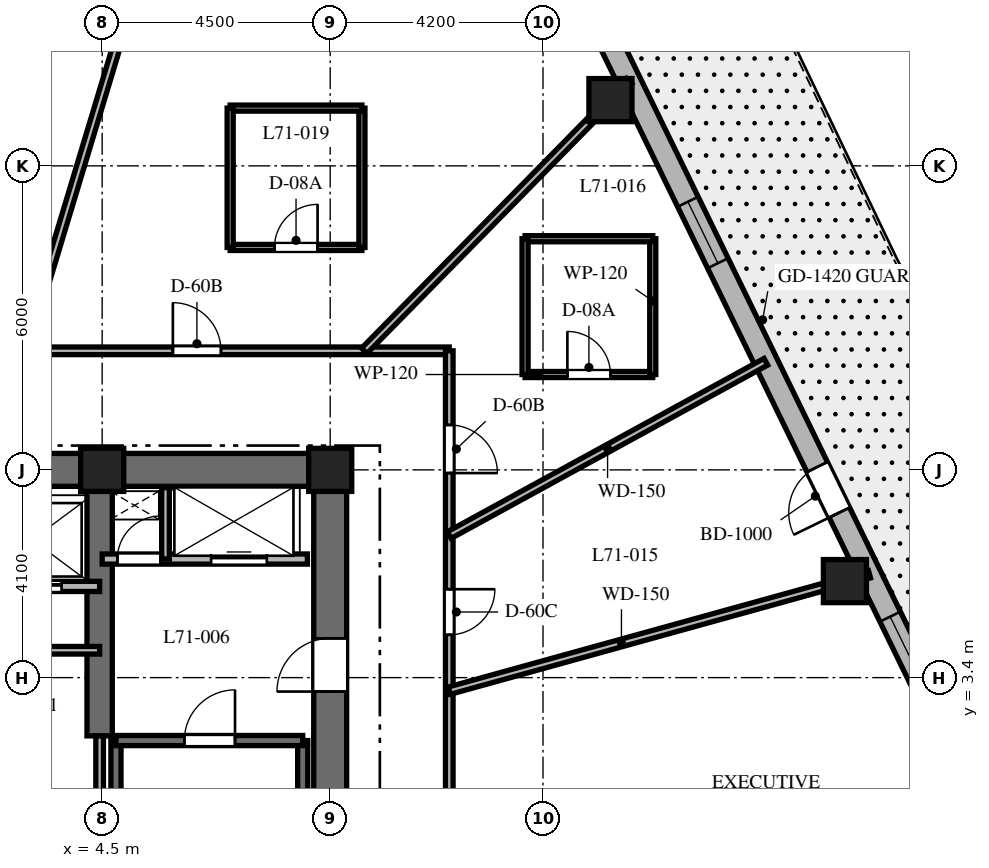
"""IFC4 building model, lengths in metres.
Left out: names, types, materials, properties, quantities, classifications, styles, units other than length and angle.
Written with IfcOpenShell. Run it as: python <this file> out.ifc"""

import sys

from ifc_helpers import new_model, si_unit, direction, frame, frame_2d, origin, origin_2d, place, context, subcontext, project, spatial, rectangle, extrude, element, fill, save


model = new_model("IFC4")
c1 = context("Model", 3, precision=1e-05, world=origin(), true_north=direction((0.0, 1.0)))
c2 = subcontext(c1, "Body", "Model", "MODEL_VIEW")
j1 = project(units=[si_unit("LENGTHUNIT", "METRE"), si_unit("PLANEANGLEUNIT", "RADIAN")], contexts=[c1])
p1 = place(None, origin())
s1 = spatial("IfcSite", under=j1, at=p1, CompositionType="ELEMENT")
p2 = place(p1, origin())
s2 = spatial("IfcBuilding", under=s1, at=p2, CompositionType="ELEMENT")
p3 = place(p2, frame((0.0, 0.0, 284.7)))
s3 = spatial("IfcBuildingStorey", under=s2, at=p3, CompositionType="ELEMENT", Elevation=284.7)
p4 = place(p3, frame((1.85, 7.5, 0.0), z_axis=(0.0, 0.0, 1.0), x_axis=(1.0, 0.0, 0.0)))
e1 = element("IfcWall", 1, at=p4, inside=s3, PredefinedType="SHEAR", context=c2, shape_type="SweptSolid", body=[
    extrude(rectangle(XDim=7.475, YDim=0.65, at=frame_2d((3.737, 0.0))), origin(), (0.0, 0.0, 1.0), 3.9),
])
p5 = place(p3, frame((9.0, -7.175, 0.0), z_axis=(0.0, 0.0, 1.0), x_axis=(0.0, 1.0, 0.0)))
e2 = element("IfcWall", 2, at=p5, inside=s3, PredefinedType="SHEAR", context=c2, shape_type="SweptSolid", body=[
    extrude(rectangle(XDim=14.35, YDim=0.65, at=frame_2d((7.175, 0.0))), origin(), (0.0, 0.0, 1.0), 3.9),
])
p6 = place(p5, frame((10.3, 0.0, 0.0)))
e3 = element("IfcOpeningElement", 3, at=p6, cuts=e2, PredefinedType="OPENING", context=c2, shape_type="SweptSolid", body=[
    extrude(rectangle(XDim=1.05, YDim=2.15, at=frame_2d((0.525, 1.075))), frame((0.0, 0.335, 0.0), z_axis=(0.0, -1.0, 0.0), x_axis=(1.0, 0.0, 0.0)), (0.0, 0.0, 1.0), 0.67),
])
p7 = place(p3, frame((4.45, 2.25, 0.0), z_axis=(0.0, 0.0, 1.0), x_axis=(0.0, 1.0, 0.0)))
e4 = element("IfcWall", 4, at=p7, inside=s3, PredefinedType="SHEAR", context=c2, shape_type="SweptSolid", body=[
    extrude(rectangle(XDim=4.925, YDim=0.5, at=frame_2d((2.462, 0.0))), origin(), (0.0, 0.0, 1.0), 3.9),
])
for number, where, z_axis, x_axis in (
    (5, (4.772, -6.985, 0.0), (0.0, 0.0, 1.0), (0.0, 1.0, 0.0)),
    (6, (8.458, -6.985, 0.0), (0.0, 0.0, 1.0), (0.0, 1.0, 0.0)),
):
    element("IfcWall", number, at=place(p3, frame(where, z_axis=z_axis, x_axis=x_axis)), inside=s3, PredefinedType="SHEAR", context=c2, shape_type="SweptSolid", body=[
        extrude(rectangle(XDim=9.143, YDim=0.2, at=frame_2d((4.572, 0.0))), origin(), (0.0, 0.0, 1.0), 3.9),
    ])
p8 = place(p3, frame((4.772, 2.158, 0.0), z_axis=(0.0, 0.0, 1.0), x_axis=(1.0, 0.0, 0.0)))
e7 = element("IfcWall", 7, at=p8, inside=s3, PredefinedType="SHEAR", context=c2, shape_type="SweptSolid", body=[
    extrude(rectangle(XDim=3.686, YDim=0.2, at=frame_2d((1.843, 0.0))), origin(), (0.0, 0.0, 1.0), 3.9),
])
p9 = place(p8, frame((1.35, 0.0, 0.0)))
e8 = element("IfcOpeningElement", 8, at=p9, cuts=e7, PredefinedType="OPENING", context=c2, shape_type="SweptSolid", body=[
    extrude(rectangle(XDim=1.0, YDim=2.15, at=frame_2d((0.5, 1.075))), frame((0.0, 0.11, 0.0), z_axis=(0.0, -1.0, 0.0), x_axis=(1.0, 0.0, 0.0)), (0.0, 0.0, 1.0), 0.22),
])
for number, where, z_axis, x_axis in (
    (9, (9.0, 7.5, 0.0), (0.0, 0.0, 1.0), (1.0, 0.0, 0.0)),
    (10, (4.5, 7.5, 0.0), (0.0, 0.0, 1.0), (1.0, 0.0, 0.0)),
    (11, (19.158, 5.305, 0.0), (0.0, 0.0, 1.0), (1.0, 0.0, 0.0)),
    (12, (14.531, 14.798, 0.0), (0.0, 0.0, 1.0), (1.0, 0.0, 0.0)),
):
    element("IfcColumn", number, at=place(p3, frame(where, z_axis=z_axis, x_axis=x_axis)), inside=s3, PredefinedType="COLUMN", context=c2, shape_type="SweptSolid", body=[
        extrude(rectangle(XDim=0.85, YDim=0.85, at=origin_2d()), origin(), (0.0, 0.0, 1.0), 3.9),
    ])
p10 = place(p3, frame((21.138, 2.371, 0.0), z_axis=(0.0, 0.0, 1.0), x_axis=(-0.438128124058, 0.89891253574, 0.0)))
e13 = element("IfcWall", 13, at=p10, inside=s3, PredefinedType="SOLIDWALL", context=c2, shape_type="SweptSolid", body=[
    extrude(rectangle(XDim=17.565, YDim=0.45, at=frame_2d((8.782, 0.0))), origin(), (0.0, 0.0, 1.0), 3.58),
])
p11 = place(p10, frame((4.769, 0.0, 0.0)))
e14 = element("IfcOpeningElement", 14, at=p11, cuts=e13, PredefinedType="OPENING", context=c2, shape_type="SweptSolid", body=[
    extrude(rectangle(XDim=1.0, YDim=2.15, at=frame_2d((0.5, 1.075))), frame((0.0, 0.235, 0.0), z_axis=(0.0, -1.0, 0.0), x_axis=(1.0, 0.0, 0.0)), (0.0, 0.0, 1.0), 0.47),
])
p12 = place(p10, frame((10.243, 0.0, 0.8)))
e15 = element("IfcOpeningElement", 15, at=p12, cuts=e13, PredefinedType="OPENING", context=c2, shape_type="SweptSolid", body=[
    extrude(rectangle(XDim=1.35, YDim=1.75, at=frame_2d((0.675, 0.875))), frame((0.0, 0.235, 0.0), z_axis=(0.0, -1.0, 0.0), x_axis=(1.0, 0.0, 0.0)), (0.0, 0.0, 1.0), 0.47),
])
p13 = place(p10, frame((15.132, 0.0, 0.8)))
e16 = element("IfcOpeningElement", 16, at=p13, cuts=e13, PredefinedType="OPENING", context=c2, shape_type="SweptSolid", body=[
    extrude(rectangle(XDim=1.35, YDim=1.75, at=frame_2d((0.675, 0.875))), frame((0.0, 0.235, 0.0), z_axis=(0.0, -1.0, 0.0), x_axis=(1.0, 0.0, 0.0)), (0.0, 0.0, 1.0), 0.47),
])
p14 = place(p10, frame((1.133, 0.0, 0.8)))
e17 = element("IfcOpeningElement", 17, at=p14, cuts=e13, PredefinedType="OPENING", context=c2, shape_type="SweptSolid", body=[
    extrude(rectangle(XDim=1.35, YDim=1.75, at=frame_2d((0.675, 0.875))), frame((0.0, 0.235, 0.0), z_axis=(0.0, -1.0, 0.0), x_axis=(1.0, 0.0, 0.0)), (0.0, 0.0, 1.0), 0.47),
])
p15 = place(p3, frame((4.5, 5.74, 0.0), z_axis=(0.0, 0.0, 1.0), x_axis=(1.0, 0.0, 0.0)))
e18 = element("IfcWall", 18, at=p15, inside=s3, PredefinedType="PARTITIONING", context=c2, shape_type="SweptSolid", body=[
    extrude(rectangle(XDim=4.05, YDim=0.2, at=frame_2d((2.025, 0.0))), origin(), (0.0, 0.0, 1.0), 3.58),
])
p16 = place(p15, frame((0.3, 0.0, 0.0)))
e19 = element("IfcOpeningElement", 19, at=p16, cuts=e18, PredefinedType="OPENING", context=c2, shape_type="SweptSolid", body=[
    extrude(rectangle(XDim=0.85, YDim=2.03, at=frame_2d((0.425, 1.015))), frame((0.0, 0.11, 0.0), z_axis=(0.0, -1.0, 0.0), x_axis=(1.0, 0.0, 0.0)), (0.0, 0.0, 1.0), 0.22),
])
p17 = place(p15, frame((2.15, 0.0, 0.0)))
e20 = element("IfcOpeningElement", 20, at=p17, cuts=e18, PredefinedType="OPENING", context=c2, shape_type="SweptSolid", body=[
    extrude(rectangle(XDim=1.1, YDim=2.2, at=frame_2d((0.55, 1.1))), frame((0.0, 0.11, 0.0), z_axis=(0.0, -1.0, 0.0), x_axis=(1.0, 0.0, 0.0)), (0.0, 0.0, 1.0), 0.22),
])
p18 = place(p3, frame((5.75, 5.74, 0.0), z_axis=(0.0, 0.0, 1.0), x_axis=(0.0, 1.0, 0.0)))
e21 = element("IfcWall", 21, at=p18, inside=s3, PredefinedType="PARTITIONING", context=c2, shape_type="SweptSolid", body=[
    extrude(rectangle(XDim=1.41, YDim=0.15, at=frame_2d((0.705, 0.0))), origin(), (0.0, 0.0, 1.0), 3.58),
])
p19 = place(p3, frame((1.85, 5.2, 0.0), z_axis=(0.0, 0.0, 1.0), x_axis=(1.0, 0.0, 0.0)))
e22 = element("IfcWall", 22, at=p19, inside=s3, PredefinedType="PARTITIONING", context=c2, shape_type="SweptSolid", body=[
    extrude(rectangle(XDim=2.6, YDim=0.2, at=frame_2d((1.3, 0.0))), origin(), (0.0, 0.0, 1.0), 3.58),
])
p20 = place(p19, frame((0.75, 0.0, 0.0)))
e23 = element("IfcOpeningElement", 23, at=p20, cuts=e22, PredefinedType="OPENING", context=c2, shape_type="SweptSolid", body=[
    extrude(rectangle(XDim=1.1, YDim=2.2, at=frame_2d((0.55, 1.1))), frame((0.0, 0.11, 0.0), z_axis=(0.0, -1.0, 0.0), x_axis=(1.0, 0.0, 0.0)), (0.0, 0.0, 1.0), 0.22),
])
p21 = place(p3, frame((4.45, -1.972, 0.0), z_axis=(0.0, 0.0, 1.0), x_axis=(0.0, 1.0, 0.0)))
e24 = element("IfcWall", 24, at=p21, inside=s3, PredefinedType="PARTITIONING", context=c2, shape_type="SweptSolid", body=[
    extrude(rectangle(XDim=4.222, YDim=0.15, at=frame_2d((2.111, 0.0))), origin(), (0.0, 0.0, 1.0), 3.58),
])
p22 = place(p3, frame((1.9, 3.94, 0.0), z_axis=(0.0, 0.0, 1.0), x_axis=(1.0, 0.0, 0.0)))
e25 = element("IfcWall", 25, at=p22, inside=s3, PredefinedType="PARTITIONING", context=c2, shape_type="SweptSolid", body=[
    extrude(rectangle(XDim=2.55, YDim=0.15, at=frame_2d((1.275, 0.0))), origin(), (0.0, 0.0, 1.0), 3.58),
])
p23 = place(p3, frame((0.92, 9.85, 0.0), z_axis=(0.0, 0.0, 1.0), x_axis=(1.0, 0.0, 0.0)))
e26 = element("IfcWall", 26, at=p23, inside=s3, PredefinedType="PARTITIONING", context=c2, shape_type="SweptSolid", body=[
    extrude(rectangle(XDim=10.43, YDim=0.15, at=frame_2d((5.215, 0.0))), origin(), (0.0, 0.0, 1.0), 3.07),
])
p24 = place(p23, frame((4.975, 0.0, 0.0)))
e27 = element("IfcOpeningElement", 27, at=p24, cuts=e26, PredefinedType="OPENING", context=c2, shape_type="SweptSolid", body=[
    extrude(rectangle(XDim=0.95, YDim=2.03, at=frame_2d((0.475, 1.015))), frame((0.0, 0.085, 0.0), z_axis=(0.0, -1.0, 0.0), x_axis=(1.0, 0.0, 0.0)), (0.0, 0.0, 1.0), 0.17),
])
p25 = place(p3, frame((11.35, 9.85, 0.0), z_axis=(0.0, 0.0, 1.0), x_axis=(0.0, -1.0, 0.0)))
e28 = element("IfcWall", 28, at=p25, inside=s3, PredefinedType="PARTITIONING", context=c2, shape_type="SweptSolid", body=[
    extrude(rectangle(XDim=12.4, YDim=0.15, at=frame_2d((6.2, 0.0))), origin(), (0.0, 0.0, 1.0), 3.07),
])
p26 = place(p25, frame((4.705, 0.0, 0.0)))
e29 = element("IfcOpeningElement", 29, at=p26, cuts=e28, PredefinedType="OPENING", context=c2, shape_type="SweptSolid", body=[
    extrude(rectangle(XDim=0.9, YDim=2.03, at=frame_2d((0.45, 1.015))), frame((0.0, 0.085, 0.0), z_axis=(0.0, -1.0, 0.0), x_axis=(1.0, 0.0, 0.0)), (0.0, 0.0, 1.0), 0.17),
])
p27 = place(p25, frame((1.463, 0.0, 0.0)))
e30 = element("IfcOpeningElement", 30, at=p27, cuts=e28, PredefinedType="OPENING", context=c2, shape_type="SweptSolid", body=[
    extrude(rectangle(XDim=0.95, YDim=2.03, at=frame_2d((0.475, 1.015))), frame((0.0, 0.085, 0.0), z_axis=(0.0, -1.0, 0.0), x_axis=(1.0, 0.0, 0.0)), (0.0, 0.0, 1.0), 0.17),
])
p28 = place(p25, frame((8.835, 0.0, 0.0)))
e31 = element("IfcOpeningElement", 31, at=p28, cuts=e28, PredefinedType="OPENING", context=c2, shape_type="SweptSolid", body=[
    extrude(rectangle(XDim=0.95, YDim=2.03, at=frame_2d((0.475, 1.015))), frame((0.0, 0.085, 0.0), z_axis=(0.0, -1.0, 0.0), x_axis=(1.0, 0.0, 0.0)), (0.0, 0.0, 1.0), 0.17),
])
p29 = place(p3, frame((11.35, 3.143, 0.0), z_axis=(0.0, 0.0, 1.0), x_axis=(0.963731818141, 0.266872596386, 0.0)))
e32 = element("IfcWall", 32, at=p29, inside=s3, PredefinedType="PARTITIONING", context=c2, shape_type="SweptSolid", body=[
    extrude(rectangle(XDim=8.605, YDim=0.15, at=frame_2d((4.302, 0.0))), origin(), (0.0, 0.0, 1.0), 2.92),
])
p30 = place(p3, frame((11.35, 6.213, 0.0), z_axis=(0.0, 0.0, 1.0), x_axis=(0.877157109774, 0.480203503499, 0.0)))
e33 = element("IfcWall", 33, at=p30, inside=s3, PredefinedType="PARTITIONING", context=c2, shape_type="SweptSolid", body=[
    extrude(rectangle(XDim=7.123, YDim=0.15, at=frame_2d((3.562, 0.0))), origin(), (0.0, 0.0, 1.0), 2.92),
])
p31 = place(p3, frame((9.672, 9.85, 0.0), z_axis=(0.0, 0.0, 1.0), x_axis=(0.700629771301, 0.713524998558, 0.0)))
e34 = element("IfcWall", 34, at=p31, inside=s3, PredefinedType="PARTITIONING", context=c2, shape_type="SweptSolid", body=[
    extrude(rectangle(XDim=7.459, YDim=0.15, at=frame_2d((3.73, 0.0))), origin(), (0.0, 0.0, 1.0), 2.92),
])
p32 = place(p3, frame((2.972, 9.85, 0.0), z_axis=(0.0, 0.0, 1.0), x_axis=(0.288872169679, 0.957367677324, 0.0)))
e35 = element("IfcWall", 35, at=p32, inside=s3, PredefinedType="PARTITIONING", context=c2, shape_type="SweptSolid", body=[
    extrude(rectangle(XDim=10.68, YDim=0.15, at=frame_2d((5.34, 0.0))), origin(), (0.0, 0.0, 1.0), 2.92),
])
p33 = place(p3, frame((12.846, 9.382, 0.0), z_axis=(0.0, 0.0, 1.0), x_axis=(1.0, 0.0, 0.0)))
e36 = element("IfcWall", 36, at=p33, inside=s3, PredefinedType="PARTITIONING", context=c2, shape_type="SweptSolid", body=[
    extrude(rectangle(XDim=2.52, YDim=0.12, at=frame_2d((1.26, 0.0))), origin(), (0.0, 0.0, 1.0), 3.106),
])
p34 = place(p33, frame((0.835, 0.0, 0.0)))
e37 = element("IfcOpeningElement", 37, at=p34, cuts=e36, PredefinedType="OPENING", context=c2, shape_type="SweptSolid", body=[
    extrude(rectangle(XDim=0.85, YDim=2.03, at=frame_2d((0.425, 1.015))), frame((0.0, 0.07, 0.0), z_axis=(0.0, -1.0, 0.0), x_axis=(1.0, 0.0, 0.0)), (0.0, 0.0, 1.0), 0.14),
])
p35 = place(p3, frame((15.366, 9.382, 0.0), z_axis=(0.0, 0.0, 1.0), x_axis=(0.0, 1.0, 0.0)))
e38 = element("IfcWall", 38, at=p35, inside=s3, PredefinedType="PARTITIONING", context=c2, shape_type="SweptSolid", body=[
    extrude(rectangle(XDim=2.68, YDim=0.12, at=frame_2d((1.34, 0.0))), origin(), (0.0, 0.0, 1.0), 3.58),
])
p36 = place(p3, frame((15.366, 12.062, 0.0), z_axis=(0.0, 0.0, 1.0), x_axis=(-1.0, 0.0, 0.0)))
e39 = element("IfcWall", 39, at=p36, inside=s3, PredefinedType="PARTITIONING", context=c2, shape_type="SweptSolid", body=[
    extrude(rectangle(XDim=2.52, YDim=0.12, at=frame_2d((1.26, 0.0))), origin(), (0.0, 0.0, 1.0), 3.106),
])
p37 = place(p3, frame((12.846, 12.062, 0.0), z_axis=(0.0, 0.0, 1.0), x_axis=(0.0, -1.0, 0.0)))
e40 = element("IfcWall", 40, at=p37, inside=s3, PredefinedType="PARTITIONING", context=c2, shape_type="SweptSolid", body=[
    extrude(rectangle(XDim=2.68, YDim=0.12, at=frame_2d((1.34, 0.0))), origin(), (0.0, 0.0, 1.0), 3.106),
])
p38 = place(p3, frame((7.026, 11.89, 0.0), z_axis=(0.0, 0.0, 1.0), x_axis=(1.0, 0.0, 0.0)))
e41 = element("IfcWall", 41, at=p38, inside=s3, PredefinedType="PARTITIONING", context=c2, shape_type="SweptSolid", body=[
    extrude(rectangle(XDim=2.6, YDim=0.12, at=frame_2d((1.3, 0.0))), origin(), (0.0, 0.0, 1.0), 3.021),
])
p39 = place(p38, frame((0.875, 0.0, 0.0)))
e42 = element("IfcOpeningElement", 42, at=p39, cuts=e41, PredefinedType="OPENING", context=c2, shape_type="SweptSolid", body=[
    extrude(rectangle(XDim=0.85, YDim=2.03, at=frame_2d((0.425, 1.015))), frame((0.0, 0.07, 0.0), z_axis=(0.0, -1.0, 0.0), x_axis=(1.0, 0.0, 0.0)), (0.0, 0.0, 1.0), 0.14),
])
p40 = place(p3, frame((9.626, 11.89, 0.0), z_axis=(0.0, 0.0, 1.0), x_axis=(0.0, 1.0, 0.0)))
e43 = element("IfcWall", 43, at=p40, inside=s3, PredefinedType="PARTITIONING", context=c2, shape_type="SweptSolid", body=[
    extrude(rectangle(XDim=2.75, YDim=0.12, at=frame_2d((1.375, 0.0))), origin(), (0.0, 0.0, 1.0), 3.152),
])
p41 = place(p3, frame((9.626, 14.64, 0.0), z_axis=(0.0, 0.0, 1.0), x_axis=(-1.0, 0.0, 0.0)))
e44 = element("IfcWall", 44, at=p41, inside=s3, PredefinedType="PARTITIONING", context=c2, shape_type="SweptSolid", body=[
    extrude(rectangle(XDim=2.6, YDim=0.12, at=frame_2d((1.3, 0.0))), origin(), (0.0, 0.0, 1.0), 3.152),
])
p42 = place(p3, frame((7.026, 14.64, 0.0), z_axis=(0.0, 0.0, 1.0), x_axis=(0.0, -1.0, 0.0)))
e45 = element("IfcWall", 45, at=p42, inside=s3, PredefinedType="PARTITIONING", context=c2, shape_type="SweptSolid", body=[
    extrude(rectangle(XDim=2.75, YDim=0.12, at=frame_2d((1.375, 0.0))), origin(), (0.0, 0.0, 1.0), 3.021),
])
p43 = place(p11, origin())
e46 = element("IfcDoor", 46, at=p43, inside=s3, OperationType="SINGLE_SWING_LEFT", PredefinedType="DOOR", context=c2, shape_type="SweptSolid", body=[
    extrude(rectangle(XDim=1.0, YDim=2.15, at=frame_2d((0.5, 1.075))), frame((0.0, 0.025, 0.0), z_axis=(0.0, -1.0, 0.0), x_axis=(1.0, 0.0, 0.0)), (0.0, 0.0, 1.0), 0.05),
])
fill(e14, e46)
p44 = place(p12, origin())
e47 = element("IfcWindow", 47, at=p44, inside=s3, PartitioningType="SINGLE_PANEL", PredefinedType="WINDOW", context=c2, shape_type="SweptSolid", body=[
    extrude(rectangle(XDim=1.35, YDim=1.75, at=frame_2d((0.675, 0.875))), frame((0.0, 0.03, 0.0), z_axis=(0.0, -1.0, 0.0), x_axis=(1.0, 0.0, 0.0)), (0.0, 0.0, 1.0), 0.06),
])
fill(e15, e47)
p45 = place(p14, origin())
e48 = element("IfcWindow", 48, at=p45, inside=s3, PartitioningType="SINGLE_PANEL", PredefinedType="WINDOW", context=c2, shape_type="SweptSolid", body=[
    extrude(rectangle(XDim=1.35, YDim=1.75, at=frame_2d((0.675, 0.875))), frame((0.0, 0.03, 0.0), z_axis=(0.0, -1.0, 0.0), x_axis=(1.0, 0.0, 0.0)), (0.0, 0.0, 1.0), 0.06),
])
fill(e17, e48)
p46 = place(p9, origin())
e49 = element("IfcDoor", 49, at=p46, inside=s3, OperationType="SINGLE_SWING_RIGHT", PredefinedType="DOOR", context=c2, shape_type="SweptSolid", body=[
    extrude(rectangle(XDim=1.0, YDim=2.15, at=frame_2d((0.5, 1.075))), frame((0.0, 0.025, 0.0), z_axis=(0.0, -1.0, 0.0), x_axis=(1.0, 0.0, 0.0)), (0.0, 0.0, 1.0), 0.05),
])
fill(e8, e49)
p47 = place(p6, origin())
e50 = element("IfcDoor", 50, at=p47, inside=s3, OperationType="SINGLE_SWING_LEFT", PredefinedType="DOOR", context=c2, shape_type="SweptSolid", body=[
    extrude(rectangle(XDim=1.05, YDim=2.15, at=frame_2d((0.525, 1.075))), frame((0.0, 0.025, 0.0), z_axis=(0.0, -1.0, 0.0), x_axis=(1.0, 0.0, 0.0)), (0.0, 0.0, 1.0), 0.05),
])
fill(e3, e50)
p48 = place(p16, origin())
e51 = element("IfcDoor", 51, at=p48, inside=s3, OperationType="SINGLE_SWING_RIGHT", PredefinedType="DOOR", context=c2, shape_type="SweptSolid", body=[
    extrude(rectangle(XDim=0.85, YDim=2.03, at=frame_2d((0.425, 1.015))), frame((0.0, 0.025, 0.0), z_axis=(0.0, -1.0, 0.0), x_axis=(1.0, 0.0, 0.0)), (0.0, 0.0, 1.0), 0.05),
])
fill(e19, e51)
p49 = place(p17, origin())
e52 = element("IfcDoor", 52, at=p49, inside=s3, OperationType="SLIDING_TO_RIGHT", PredefinedType="DOOR", context=c2, shape_type="SweptSolid", body=[
    extrude(rectangle(XDim=1.1, YDim=2.2, at=frame_2d((0.55, 1.1))), frame((0.0, 0.025, 0.0), z_axis=(0.0, -1.0, 0.0), x_axis=(1.0, 0.0, 0.0)), (0.0, 0.0, 1.0), 0.05),
])
fill(e20, e52)
p50 = place(p20, origin())
e53 = element("IfcDoor", 53, at=p50, inside=s3, OperationType="SLIDING_TO_RIGHT", PredefinedType="DOOR", context=c2, shape_type="SweptSolid", body=[
    extrude(rectangle(XDim=1.1, YDim=2.2, at=frame_2d((0.55, 1.1))), frame((0.0, 0.025, 0.0), z_axis=(0.0, -1.0, 0.0), x_axis=(1.0, 0.0, 0.0)), (0.0, 0.0, 1.0), 0.05),
])
fill(e23, e53)
p51 = place(p26, origin())
e54 = element("IfcDoor", 54, at=p51, inside=s3, OperationType="SINGLE_SWING_LEFT", PredefinedType="DOOR", context=c2, shape_type="SweptSolid", body=[
    extrude(rectangle(XDim=0.9, YDim=2.03, at=frame_2d((0.45, 1.015))), frame((0.0, 0.025, 0.0), z_axis=(0.0, -1.0, 0.0), x_axis=(1.0, 0.0, 0.0)), (0.0, 0.0, 1.0), 0.05),
])
fill(e29, e54)
p52 = place(p27, origin())
e55 = element("IfcDoor", 55, at=p52, inside=s3, OperationType="SINGLE_SWING_RIGHT", PredefinedType="DOOR", context=c2, shape_type="SweptSolid", body=[
    extrude(rectangle(XDim=0.95, YDim=2.03, at=frame_2d((0.475, 1.015))), frame((0.0, 0.025, 0.0), z_axis=(0.0, -1.0, 0.0), x_axis=(1.0, 0.0, 0.0)), (0.0, 0.0, 1.0), 0.05),
])
fill(e30, e55)
p53 = place(p34, origin())
e56 = element("IfcDoor", 56, at=p53, inside=s3, OperationType="SINGLE_SWING_LEFT", PredefinedType="DOOR", context=c2, shape_type="SweptSolid", body=[
    extrude(rectangle(XDim=0.85, YDim=2.03, at=frame_2d((0.425, 1.015))), frame((0.0, 0.025, 0.0), z_axis=(0.0, -1.0, 0.0), x_axis=(1.0, 0.0, 0.0)), (0.0, 0.0, 1.0), 0.05),
])
fill(e37, e56)
p54 = place(p24, origin())
e57 = element("IfcDoor", 57, at=p54, inside=s3, OperationType="SINGLE_SWING_LEFT", PredefinedType="DOOR", context=c2, shape_type="SweptSolid", body=[
    extrude(rectangle(XDim=0.95, YDim=2.03, at=frame_2d((0.475, 1.015))), frame((0.0, 0.025, 0.0), z_axis=(0.0, -1.0, 0.0), x_axis=(1.0, 0.0, 0.0)), (0.0, 0.0, 1.0), 0.05),
])
fill(e27, e57)
p55 = place(p39, origin())
e58 = element("IfcDoor", 58, at=p55, inside=s3, OperationType="SINGLE_SWING_RIGHT", PredefinedType="DOOR", context=c2, shape_type="SweptSolid", body=[
    extrude(rectangle(XDim=0.85, YDim=2.03, at=frame_2d((0.425, 1.015))), frame((0.0, 0.025, 0.0), z_axis=(0.0, -1.0, 0.0), x_axis=(1.0, 0.0, 0.0)), (0.0, 0.0, 1.0), 0.05),
])
fill(e42, e58)
save(model, sys.argv[1])
